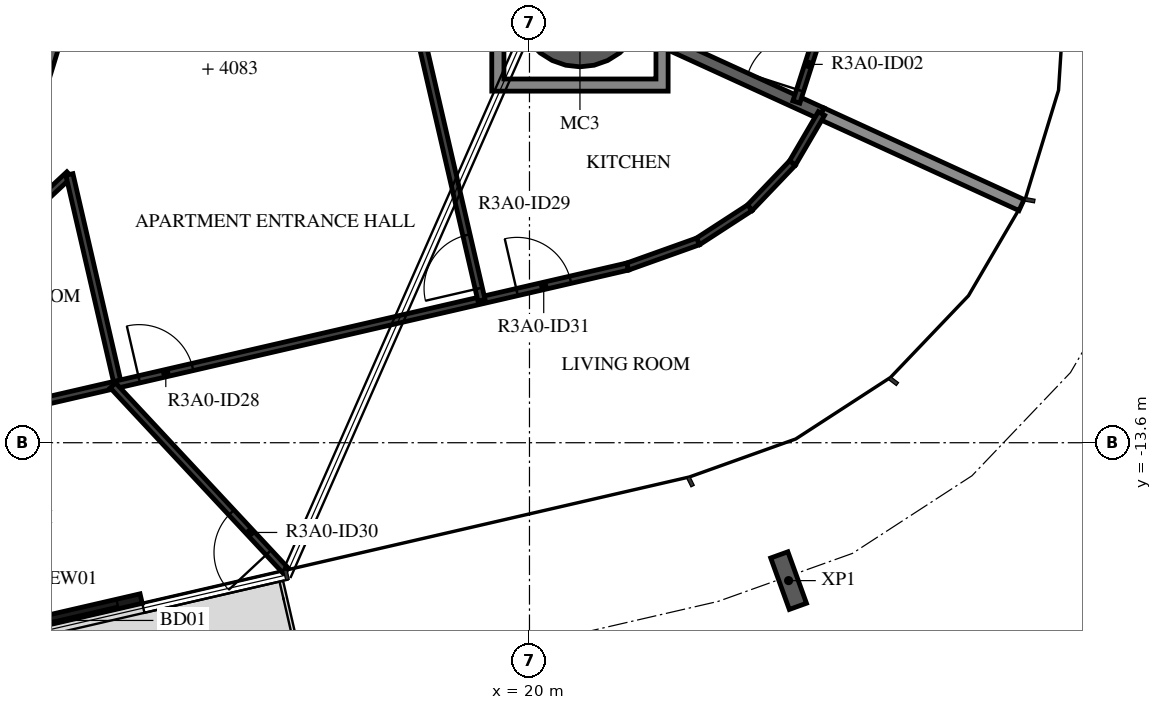
"""IFC4 building model, lengths in metres.
Left out: names, types, materials, properties, quantities, classifications, styles, units other than length and angle.
Written with IfcOpenShell. Run it as: python <this file> out.ifc"""

import sys

from ifc_helpers import new_model, si_unit, direction, frame, frame_2d, origin, origin_2d, place, context, subcontext, project, spatial, polyline, rectangle, hollow_circle, i_section, outline, extrude, element, fill, save


model = new_model("IFC4")
c1 = context("Model", 3, precision=1e-05, world=origin(), true_north=direction((0.0, 1.0)))
c2 = subcontext(c1, "Body", "Model", "MODEL_VIEW")
j1 = project(units=[si_unit("LENGTHUNIT", "METRE"), si_unit("PLANEANGLEUNIT", "RADIAN")], contexts=[c1])
p1 = place(None, origin())
s1 = spatial("IfcSite", under=j1, at=p1, CompositionType="ELEMENT")
p2 = place(p1, origin())
s2 = spatial("IfcBuilding", under=s1, at=p2, CompositionType="ELEMENT")
p3 = place(p2, frame((0.0, 0.0, 120.4)))
s3 = spatial("IfcBuildingStorey", under=s2, at=p3, CompositionType="ELEMENT", Elevation=120.4)
p4 = place(p3, frame((20.83, -6.368, -0.38), z_axis=(0.0, 0.0, 1.0), x_axis=(1.0, 0.0, 0.0)))
e1 = element("IfcColumn", 1, at=p4, inside=s3, PredefinedType="COLUMN", context=c2, shape_type="SweptSolid", body=[
    extrude(hollow_circle(Radius=1.05, WallThickness=0.05, at=origin_2d()), origin(), (0.0, 0.0, 1.0), 3.5),
])
p5 = place(p3, frame((24.261, -15.868, -0.38), z_axis=(0.0, 0.0, 1.0), x_axis=(-0.940523325903, -0.339729117728, 0.0)))
e2 = element("IfcColumn", 2, at=p5, inside=s3, PredefinedType="COLUMN", context=c2, shape_type="SweptSolid", body=[
    extrude(i_section(OverallWidth=0.3, OverallDepth=0.9, WebThickness=0.019, FlangeThickness=0.035, FilletRadius=0.03, at=origin_2d()), origin(), (0.0, 0.0, 1.0), 3.5),
])
p6 = place(p3, frame((10.496, -16.883, 0.0), z_axis=(0.0, 0.0, 1.0), x_axis=(0.974364187477, 0.224976510247, 0.0)))
e3 = element("IfcWall", 3, at=p6, inside=s3, PredefinedType="STANDARD", context=c2, shape_type="SweptSolid", body=[
    extrude(rectangle(XDim=3.2, YDim=0.16, at=frame_2d((1.6, 0.0))), origin(), (0.0, 0.0, 1.0), 3.12),
])
p7 = place(p6, frame((0.4, 0.0, 0.0)))
e4 = element("IfcOpeningElement", 4, at=p7, cuts=e3, PredefinedType="OPENING", context=c2, shape_type="SweptSolid", body=[
    extrude(rectangle(XDim=2.4, YDim=2.4, at=frame_2d((1.2, 1.2))), frame((0.0, 0.09, 0.0), z_axis=(0.0, -1.0, 0.0), x_axis=(1.0, 0.0, 0.0)), (0.0, 0.0, 1.0), 0.18),
])
p8 = place(p3, frame((12.028, -7.516, 0.0), z_axis=(0.0, 0.0, 1.0), x_axis=(0.292365533182, 0.956306642771, 0.0)))
e5 = element("IfcWall", 5, at=p8, inside=s3, PredefinedType="STANDARD", context=c2, shape_type="SweptSolid", body=[
    extrude(rectangle(XDim=7.342, YDim=0.2, at=frame_2d((3.671, 0.0))), origin(), (0.0, 0.0, 1.0), 3.12),
])
p9 = place(p3, frame((22.28, -7.033, 0.0), z_axis=(0.0, 0.0, 1.0), x_axis=(0.909468768003, -0.415772245378, 0.0)))
e6 = element("IfcWall", 6, at=p9, inside=s3, PredefinedType="STANDARD", context=c2, shape_type="SweptSolid", body=[
    extrude(rectangle(XDim=2.773, YDim=0.2, at=frame_2d((1.386, 0.0))), origin(), (0.0, 0.0, 1.0), 3.12),
])
p10 = place(p3, frame((24.802, -8.186, 0.0), z_axis=(0.0, 0.0, 1.0), x_axis=(0.909307466213, -0.416124899387, 0.0)))
e7 = element("IfcWall", 7, at=p10, inside=s3, PredefinedType="STANDARD", context=c2, shape_type="SweptSolid", body=[
    extrude(rectangle(XDim=3.618, YDim=0.2, at=frame_2d((1.809, 0.0))), origin(), (0.0, 0.0, 1.0), 2.73),
])
p11 = place(p3, frame((24.389, -7.997, 0.0), z_axis=(0.0, 0.0, 1.0), x_axis=(0.305723184389, 0.952120441188, 0.0)))
e8 = element("IfcWall", 8, at=p11, inside=s3, PredefinedType="PARTITIONING", context=c2, shape_type="SweptSolid", body=[
    extrude(rectangle(XDim=2.515, YDim=0.12, at=frame_2d((1.257, 0.0))), origin(), (0.0, 0.0, 1.0), 3.12),
])
p12 = place(p11, frame((0.2, 0.0, 0.0)))
e9 = element("IfcOpeningElement", 9, at=p12, cuts=e8, PredefinedType="OPENING", context=c2, shape_type="SweptSolid", body=[
    extrude(rectangle(XDim=0.9, YDim=2.1, at=frame_2d((0.45, 1.05))), frame((0.0, 0.07, 0.0), z_axis=(0.0, -1.0, 0.0), x_axis=(1.0, 0.0, 0.0)), (0.0, 0.0, 1.0), 0.14),
])
p13 = place(p3, frame((7.388, -13.894, 0.0), z_axis=(0.0, 0.0, 1.0), x_axis=(0.731339966659, 0.682013088707, 0.0)))
e10 = element("IfcWall", 10, at=p13, inside=s3, PredefinedType="PARTITIONING", context=c2, shape_type="SweptSolid", body=[
    extrude(rectangle(XDim=6.899, YDim=0.12, at=frame_2d((3.45, 0.0))), origin(), (0.0, 0.0, 1.0), 3.12),
])
p14 = place(p13, frame((1.3, 0.0, 0.0)))
e11 = element("IfcOpeningElement", 11, at=p14, cuts=e10, PredefinedType="OPENING", context=c2, shape_type="SweptSolid", body=[
    extrude(rectangle(XDim=0.8, YDim=2.1, at=frame_2d((0.4, 1.05))), frame((0.0, 0.07, 0.0), z_axis=(0.0, -1.0, 0.0), x_axis=(1.0, 0.0, 0.0)), (0.0, 0.0, 1.0), 0.14),
])
p15 = place(p3, frame((12.434, -9.189, 0.0), z_axis=(0.0, 0.0, 1.0), x_axis=(0.224924972887, -0.974376085796, 0.0)))
e12 = element("IfcWall", 12, at=p15, inside=s3, PredefinedType="PARTITIONING", context=c2, shape_type="SweptSolid", body=[
    extrude(rectangle(XDim=3.541, YDim=0.12, at=frame_2d((1.771, 0.0))), origin(), (0.0, 0.0, 1.0), 3.12),
])
p16 = place(p3, frame((7.312, -14.005, 0.0), z_axis=(0.0, 0.0, 1.0), x_axis=(0.974367924791, 0.224960323474, 0.0)))
e13 = element("IfcWall", 13, at=p16, inside=s3, PredefinedType="PARTITIONING", context=c2, shape_type="SweptSolid", body=[
    extrude(rectangle(XDim=14.679, YDim=0.12, at=frame_2d((7.34, 0.0))), origin(), (0.0, 0.0, 1.0), 3.12),
])
p17 = place(p16, frame((6.433, 0.0, 0.0)))
e14 = element("IfcOpeningElement", 14, at=p17, cuts=e13, PredefinedType="OPENING", context=c2, shape_type="SweptSolid", body=[
    extrude(rectangle(XDim=0.9, YDim=2.1, at=frame_2d((0.45, 1.05))), frame((0.0, 0.07, 0.0), z_axis=(0.0, -1.0, 0.0), x_axis=(1.0, 0.0, 0.0)), (0.0, 0.0, 1.0), 0.14),
])
p18 = place(p16, frame((12.812, 0.0, 0.0)))
e15 = element("IfcOpeningElement", 15, at=p18, cuts=e13, PredefinedType="OPENING", context=c2, shape_type="SweptSolid", body=[
    extrude(rectangle(XDim=0.9, YDim=2.1, at=frame_2d((0.45, 1.05))), frame((0.0, 0.07, 0.0), z_axis=(0.0, -1.0, 0.0), x_axis=(1.0, 0.0, 0.0)), (0.0, 0.0, 1.0), 0.14),
])
p19 = place(p3, frame((19.211, -11.258, 0.0), z_axis=(0.0, 0.0, 1.0), x_axis=(-0.22499500936, 0.974359915926, 0.0)))
e16 = element("IfcWall", 16, at=p19, inside=s3, PredefinedType="PARTITIONING", context=c2, shape_type="SweptSolid", body=[
    extrude(rectangle(XDim=5.921, YDim=0.12, at=frame_2d((2.961, 0.0))), origin(), (0.0, 0.0, 1.0), 3.12),
])
p20 = place(p19, frame((0.2, 0.0, 0.0)))
e17 = element("IfcOpeningElement", 17, at=p20, cuts=e16, PredefinedType="OPENING", context=c2, shape_type="SweptSolid", body=[
    extrude(rectangle(XDim=0.9, YDim=2.1, at=frame_2d((0.45, 1.05))), frame((0.0, 0.07, 0.0), z_axis=(0.0, -1.0, 0.0), x_axis=(1.0, 0.0, 0.0)), (0.0, 0.0, 1.0), 0.14),
])
p21 = place(p3, frame((15.985, -15.698, 0.0), z_axis=(0.0, 0.0, 1.0), x_axis=(-0.681979185924, 0.731371581322, 0.0)))
e18 = element("IfcWall", 18, at=p21, inside=s3, PredefinedType="PARTITIONING", context=c2, shape_type="SweptSolid", body=[
    extrude(rectangle(XDim=4.157, YDim=0.12, at=frame_2d((2.079, 0.0))), origin(), (0.0, 0.0, 1.0), 3.12),
])
p22 = place(p21, frame((0.4, 0.0, 0.0)))
e19 = element("IfcOpeningElement", 19, at=p22, cuts=e18, PredefinedType="OPENING", context=c2, shape_type="SweptSolid", body=[
    extrude(rectangle(XDim=0.9, YDim=2.1, at=frame_2d((0.45, 1.05))), frame((0.0, 0.07, 0.0), z_axis=(0.0, -1.0, 0.0), x_axis=(1.0, 0.0, 0.0)), (0.0, 0.0, 1.0), 0.14),
])
p23 = place(p3, frame((24.802, -8.186, 0.0), z_axis=(0.0, 0.0, 1.0), x_axis=(-0.505043103481, -0.863094122113, 0.0)))
e20 = element("IfcWall", 20, at=p23, inside=s3, PredefinedType="PARTITIONING", context=c2, shape_type="SweptSolid", body=[
    extrude(rectangle(XDim=0.945, YDim=0.12, at=frame_2d((0.473, 0.0))), origin(), (0.0, 0.0, 1.0), 3.12),
])
for number, where, z_axis, x_axis in (
    (21, (24.324, -9.002, 0.0), (0.0, 0.0, 1.0), (-0.69, -0.723, 0.0)),
    (22, (23.623, -9.737, 0.0), (0.0, 0.0, 1.0), (-0.839, -0.545, 0.0)),
):
    element("IfcWall", number, at=place(p3, frame(where, z_axis=z_axis, x_axis=x_axis)), inside=s3, PredefinedType="PARTITIONING", context=c2, shape_type="SweptSolid", body=[
        extrude(rectangle(XDim=1.016, YDim=0.12, at=frame_2d((0.508, 0.0))), origin(), (0.0, 0.0, 1.0), 3.12),
    ])
p24 = place(p3, frame((22.771, -10.29, 0.0), z_axis=(0.0, 0.0, 1.0), x_axis=(-0.941701391526, -0.336449831623, 0.0)))
e23 = element("IfcWall", 23, at=p24, inside=s3, PredefinedType="PARTITIONING", context=c2, shape_type="SweptSolid", body=[
    extrude(rectangle(XDim=1.227, YDim=0.12, at=frame_2d((0.614, 0.0))), origin(), (0.0, 0.0, 1.0), 3.12),
])
p25 = place(p3, origin())
e24 = element("IfcWall", 24, at=p25, inside=s3, PredefinedType="STANDARD", context=c2, shape_type="SweptSolid", body=[
    extrude(outline(polyline([(22.28, -4.918), (22.28, -7.818), (19.38, -7.818), (19.38, -4.918), (22.28, -4.918)]), holes=[polyline([(19.58, -7.618), (22.08, -7.618), (22.08, -5.118), (19.58, -5.118), (19.58, -7.618)])]), origin(), (0.0, 0.0, 1.0), 3.12),
])
p26 = place(p7, origin())
e25 = element("IfcDoor", 25, at=p26, inside=s3, OperationType="DOUBLE_DOOR_SLIDING", PredefinedType="DOOR", context=c2, shape_type="SweptSolid", body=[
    extrude(rectangle(XDim=2.4, YDim=2.4, at=frame_2d((1.2, 1.2))), frame((0.0, 0.025, 0.0), z_axis=(0.0, -1.0, 0.0), x_axis=(1.0, 0.0, 0.0)), (0.0, 0.0, 1.0), 0.05),
])
fill(e4, e25)
p27 = place(p12, origin())
e26 = element("IfcDoor", 26, at=p27, inside=s3, OperationType="SINGLE_SWING_LEFT", PredefinedType="DOOR", context=c2, shape_type="SweptSolid", body=[
    extrude(rectangle(XDim=0.9, YDim=2.1, at=frame_2d((0.45, 1.05))), frame((0.0, 0.025, 0.0), z_axis=(0.0, -1.0, 0.0), x_axis=(1.0, 0.0, 0.0)), (0.0, 0.0, 1.0), 0.05),
])
fill(e9, e26)
p28 = place(p17, origin())
e27 = element("IfcDoor", 27, at=p28, inside=s3, OperationType="SINGLE_SWING_RIGHT", PredefinedType="DOOR", context=c2, shape_type="SweptSolid", body=[
    extrude(rectangle(XDim=0.9, YDim=2.1, at=frame_2d((0.45, 1.05))), frame((0.0, 0.025, 0.0), z_axis=(0.0, -1.0, 0.0), x_axis=(1.0, 0.0, 0.0)), (0.0, 0.0, 1.0), 0.05),
])
fill(e14, e27)
p29 = place(p20, origin())
e28 = element("IfcDoor", 28, at=p29, inside=s3, OperationType="SINGLE_SWING_RIGHT", PredefinedType="DOOR", context=c2, shape_type="SweptSolid", body=[
    extrude(rectangle(XDim=0.9, YDim=2.1, at=frame_2d((0.45, 1.05))), frame((0.0, 0.025, 0.0), z_axis=(0.0, -1.0, 0.0), x_axis=(1.0, 0.0, 0.0)), (0.0, 0.0, 1.0), 0.05),
])
fill(e17, e28)
p30 = place(p22, origin())
e29 = element("IfcDoor", 29, at=p30, inside=s3, OperationType="SINGLE_SWING_LEFT", PredefinedType="DOOR", context=c2, shape_type="SweptSolid", body=[
    extrude(rectangle(XDim=0.9, YDim=2.1, at=frame_2d((0.45, 1.05))), frame((0.0, 0.025, 0.0), z_axis=(0.0, -1.0, 0.0), x_axis=(1.0, 0.0, 0.0)), (0.0, 0.0, 1.0), 0.05),
])
fill(e19, e29)
p31 = place(p18, origin())
e30 = element("IfcDoor", 30, at=p31, inside=s3, OperationType="SINGLE_SWING_LEFT", PredefinedType="DOOR", context=c2, shape_type="SweptSolid", body=[
    extrude(rectangle(XDim=0.9, YDim=2.1, at=frame_2d((0.45, 1.05))), frame((0.0, 0.025, 0.0), z_axis=(0.0, -1.0, 0.0), x_axis=(1.0, 0.0, 0.0)), (0.0, 0.0, 1.0), 0.05),
])
fill(e15, e30)
save(model, sys.argv[1])
